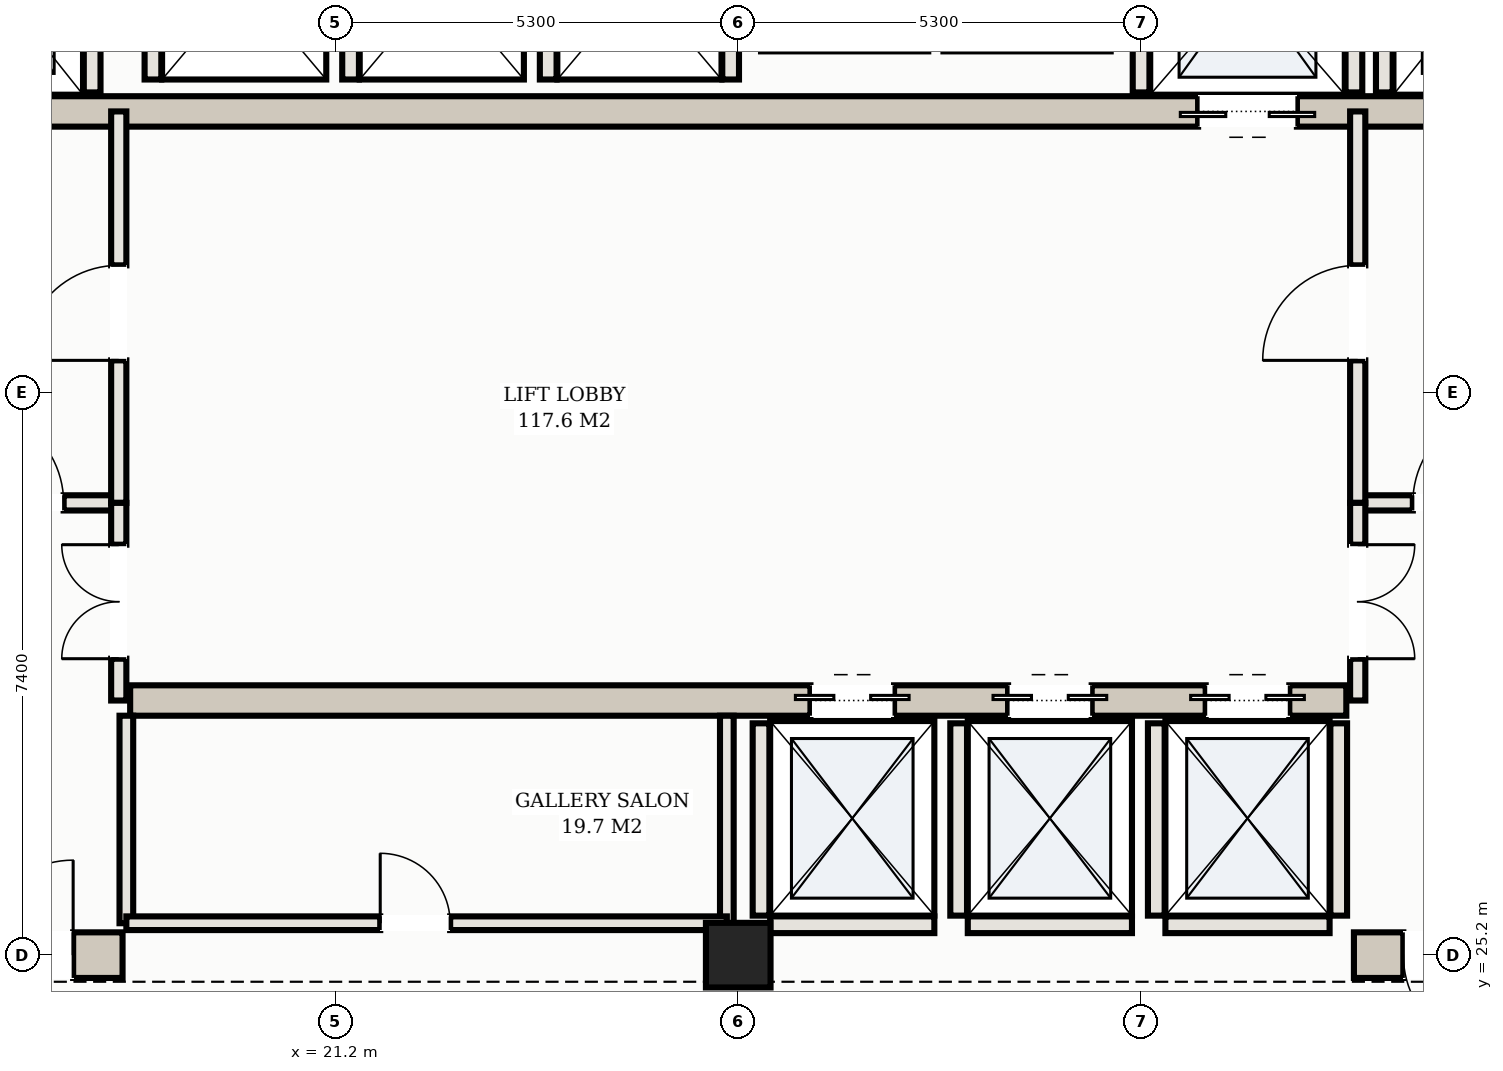
"""IFC4 building model, lengths in metres.
Left out: names, types, materials, properties, quantities, classifications, styles, units other than length and angle.
Written with IfcOpenShell. Run it as: python <this file> out.ifc"""

import sys

from ifc_helpers import new_model, si_unit, direction, frame, frame_2d, origin, origin_2d, place, context, subcontext, project, spatial, rectangle, hollow_rectangle, extrude, element, fill, save


model = new_model("IFC4")
c1 = context("Model", 3, precision=1e-05, world=origin(), true_north=direction((0.0, 1.0)))
c2 = subcontext(c1, "Body", "Model", "MODEL_VIEW")
j1 = project(units=[si_unit("LENGTHUNIT", "METRE"), si_unit("PLANEANGLEUNIT", "RADIAN")], contexts=[c1])
p1 = place(None, origin())
s1 = spatial("IfcSite", under=j1, at=p1, CompositionType="ELEMENT")
p2 = place(p1, origin())
s2 = spatial("IfcBuilding", under=s1, at=p2, CompositionType="ELEMENT")
p3 = place(p2, frame((0.0, 0.0, 175.5)))
s3 = spatial("IfcBuildingStorey", under=s2, at=p3, CompositionType="ELEMENT", Elevation=175.5)
p4 = place(p3, frame((10.3, 25.2, 0.0), z_axis=(0.0, 0.0, 1.0), x_axis=(1.0, 0.0, 0.0)))
e1 = element("IfcWall", 1, at=p4, inside=s3, PredefinedType="SHEAR", context=c2, shape_type="SweptSolid", body=[
    extrude(rectangle(XDim=8.1, YDim=0.6, at=frame_2d((4.05, 0.0))), origin(), (0.0, 0.0, 1.0), 3.1),
])
p5 = place(p4, frame((6.2, 0.0, 0.0)))
e2 = element("IfcOpeningElement", 2, at=p5, cuts=e1, PredefinedType="OPENING", context=c2, shape_type="SweptSolid", body=[
    extrude(rectangle(XDim=1.25, YDim=2.2, at=frame_2d((0.625, 1.1))), frame((0.0, 0.31, 0.0), z_axis=(0.0, -1.0, 0.0), x_axis=(1.0, 0.0, 0.0)), (0.0, 0.0, 1.0), 0.62),
])
p6 = place(p3, frame((34.6, 25.2, 0.0), z_axis=(0.0, 0.0, 1.0), x_axis=(1.0, 0.0, 0.0)))
e3 = element("IfcWall", 3, at=p6, inside=s3, PredefinedType="SHEAR", context=c2, shape_type="SweptSolid", body=[
    extrude(rectangle(XDim=8.1, YDim=0.6, at=frame_2d((4.05, 0.0))), origin(), (0.0, 0.0, 1.0), 3.1),
])
p7 = place(p6, frame((0.65, 0.0, 0.0)))
e4 = element("IfcOpeningElement", 4, at=p7, cuts=e3, PredefinedType="OPENING", context=c2, shape_type="SweptSolid", body=[
    extrude(rectangle(XDim=1.25, YDim=2.2, at=frame_2d((0.625, 1.1))), frame((0.0, 0.31, 0.0), z_axis=(0.0, -1.0, 0.0), x_axis=(1.0, 0.0, 0.0)), (0.0, 0.0, 1.0), 0.62),
])
p8 = place(p3, frame((15.5, 36.3, 0.0), z_axis=(0.0, 0.0, 1.0), x_axis=(1.0, 0.0, 0.0)))
e5 = element("IfcWall", 5, at=p8, inside=s3, PredefinedType="SHEAR", context=c2, shape_type="SweptSolid", body=[
    extrude(rectangle(XDim=22.0, YDim=0.4, at=frame_2d((11.0, 0.0))), origin(), (0.0, 0.0, 1.0), 3.1),
])
p9 = place(p8, frame((0.65, 0.0, 0.0)))
e6 = element("IfcOpeningElement", 6, at=p9, cuts=e5, PredefinedType="OPENING", context=c2, shape_type="SweptSolid", body=[
    extrude(rectangle(XDim=1.1, YDim=2.15, at=frame_2d((0.55, 1.075))), frame((0.0, 0.21, 0.0), z_axis=(0.0, -1.0, 0.0), x_axis=(1.0, 0.0, 0.0)), (0.0, 0.0, 1.0), 0.42),
])
p10 = place(p8, frame((20.25, 0.0, 0.0)))
e7 = element("IfcOpeningElement", 7, at=p10, cuts=e5, PredefinedType="OPENING", context=c2, shape_type="SweptSolid", body=[
    extrude(rectangle(XDim=1.1, YDim=2.15, at=frame_2d((0.55, 1.075))), frame((0.0, 0.21, 0.0), z_axis=(0.0, -1.0, 0.0), x_axis=(1.0, 0.0, 0.0)), (0.0, 0.0, 1.0), 0.42),
])
p11 = place(p8, frame((17.05, 0.0, 0.0)))
e8 = element("IfcOpeningElement", 8, at=p11, cuts=e5, PredefinedType="OPENING", context=c2, shape_type="SweptSolid", body=[
    extrude(rectangle(XDim=1.3, YDim=2.2, at=frame_2d((0.65, 1.1))), frame((0.0, 0.21, 0.0), z_axis=(0.0, -1.0, 0.0), x_axis=(1.0, 0.0, 0.0)), (0.0, 0.0, 1.0), 0.42),
])
p12 = place(p3, frame((18.5, 28.55, 0.0), z_axis=(0.0, 0.0, 1.0), x_axis=(1.0, 0.0, 0.0)))
e9 = element("IfcWall", 9, at=p12, inside=s3, PredefinedType="SHEAR", context=c2, shape_type="SweptSolid", body=[
    extrude(rectangle(XDim=16.0, YDim=0.4, at=frame_2d((8.0, 0.0))), origin(), (0.0, 0.0, 1.0), 3.1),
])
p13 = place(p12, frame((8.95, 0.0, 0.0)))
e10 = element("IfcOpeningElement", 10, at=p13, cuts=e9, PredefinedType="OPENING", context=c2, shape_type="SweptSolid", body=[
    extrude(rectangle(XDim=1.1, YDim=2.15, at=frame_2d((0.55, 1.075))), frame((0.0, 0.21, 0.0), z_axis=(0.0, -1.0, 0.0), x_axis=(1.0, 0.0, 0.0)), (0.0, 0.0, 1.0), 0.42),
])
p14 = place(p12, frame((11.55, 0.0, 0.0)))
e11 = element("IfcOpeningElement", 11, at=p14, cuts=e9, PredefinedType="OPENING", context=c2, shape_type="SweptSolid", body=[
    extrude(rectangle(XDim=1.1, YDim=2.15, at=frame_2d((0.55, 1.075))), frame((0.0, 0.21, 0.0), z_axis=(0.0, -1.0, 0.0), x_axis=(1.0, 0.0, 0.0)), (0.0, 0.0, 1.0), 0.42),
])
p15 = place(p12, frame((14.15, 0.0, 0.0)))
e12 = element("IfcOpeningElement", 12, at=p15, cuts=e9, PredefinedType="OPENING", context=c2, shape_type="SweptSolid", body=[
    extrude(rectangle(XDim=1.1, YDim=2.15, at=frame_2d((0.55, 1.075))), frame((0.0, 0.21, 0.0), z_axis=(0.0, -1.0, 0.0), x_axis=(1.0, 0.0, 0.0)), (0.0, 0.0, 1.0), 0.42),
])
p16 = place(p3, frame((26.5, 25.2, 0.0), z_axis=(0.0, 0.0, 1.0), x_axis=(1.0, 0.0, 0.0)))
e13 = element("IfcColumn", 13, at=p16, inside=s3, PredefinedType="COLUMN", context=c2, shape_type="SweptSolid", body=[
    extrude(hollow_rectangle(XDim=0.85, YDim=0.85, WallThickness=0.028, at=origin_2d()), origin(), (0.0, 0.0, 1.0), 3.3),
])
for number, where, z_axis, x_axis in (
    (14, (18.0, 36.55, 0.0), (0.0, 0.0, 1.0), (0.0, 1.0, 0.0)),
    (15, (35.0, 36.55, 0.0), (0.0, 0.0, 1.0), (0.0, 1.0, 0.0)),
    (16, (31.8, 36.55, 0.0), (0.0, 0.0, 1.0), (0.0, 1.0, 0.0)),
    (17, (34.6, 36.55, 0.0), (0.0, 0.0, 1.0), (0.0, 1.0, 0.0)),
):
    element("IfcWall", number, at=place(p3, frame(where, z_axis=z_axis, x_axis=x_axis)), inside=s3, PredefinedType="SOLIDWALL", context=c2, shape_type="SweptSolid", body=[
        extrude(rectangle(XDim=2.93, YDim=0.22, at=frame_2d((1.465, 0.0))), origin(), (0.0, 0.0, 1.0), 3.1),
    ])
p17 = place(p3, frame((26.8, 25.72, 0.0), z_axis=(0.0, 0.0, 1.0), x_axis=(0.0, 1.0, 0.0)))
e18 = element("IfcWall", 18, at=p17, inside=s3, PredefinedType="SOLIDWALL", context=c2, shape_type="SweptSolid", body=[
    extrude(rectangle(XDim=2.53, YDim=0.22, at=frame_2d((1.265, 0.0))), origin(), (0.0, 0.0, 1.0), 3.1),
])
p18 = place(p3, frame((26.92, 25.6, 0.0), z_axis=(0.0, 0.0, 1.0), x_axis=(1.0, 0.0, 0.0)))
e19 = element("IfcWall", 19, at=p18, inside=s3, PredefinedType="SOLIDWALL", context=c2, shape_type="SweptSolid", body=[
    extrude(rectangle(XDim=2.16, YDim=0.22, at=frame_2d((1.08, 0.0))), origin(), (0.0, 0.0, 1.0), 2.295),
])
p19 = place(p3, frame((29.4, 25.72, 0.0), z_axis=(0.0, 0.0, 1.0), x_axis=(0.0, 1.0, 0.0)))
e20 = element("IfcWall", 20, at=p19, inside=s3, PredefinedType="SOLIDWALL", context=c2, shape_type="SweptSolid", body=[
    extrude(rectangle(XDim=2.53, YDim=0.22, at=frame_2d((1.265, 0.0))), origin(), (0.0, 0.0, 1.0), 3.1),
])
p20 = place(p3, frame((29.52, 25.6, 0.0), z_axis=(0.0, 0.0, 1.0), x_axis=(1.0, 0.0, 0.0)))
e21 = element("IfcWall", 21, at=p20, inside=s3, PredefinedType="SOLIDWALL", context=c2, shape_type="SweptSolid", body=[
    extrude(rectangle(XDim=2.16, YDim=0.22, at=frame_2d((1.08, 0.0))), origin(), (0.0, 0.0, 1.0), 2.295),
])
for number, where, z_axis, x_axis in (
    (22, (32.0, 25.72, 0.0), (0.0, 0.0, 1.0), (0.0, 1.0, 0.0)),
    (23, (34.4, 25.72, 0.0), (0.0, 0.0, 1.0), (0.0, 1.0, 0.0)),
):
    element("IfcWall", number, at=place(p3, frame(where, z_axis=z_axis, x_axis=x_axis)), inside=s3, PredefinedType="SOLIDWALL", context=c2, shape_type="SweptSolid", body=[
        extrude(rectangle(XDim=2.53, YDim=0.22, at=frame_2d((1.265, 0.0))), origin(), (0.0, 0.0, 1.0), 3.1),
    ])
p21 = place(p3, frame((32.12, 25.6, 0.0), z_axis=(0.0, 0.0, 1.0), x_axis=(1.0, 0.0, 0.0)))
e24 = element("IfcWall", 24, at=p21, inside=s3, PredefinedType="SOLIDWALL", context=c2, shape_type="SweptSolid", body=[
    extrude(rectangle(XDim=2.16, YDim=0.22, at=frame_2d((1.08, 0.0))), origin(), (0.0, 0.0, 1.0), 2.295),
])
for number, where, z_axis, x_axis in (
    (25, (18.8, 36.72, 0.0), (0.0, 0.0, 1.0), (0.0, 1.0, 0.0)),
    (26, (21.4, 36.72, 0.0), (0.0, 0.0, 1.0), (0.0, 1.0, 0.0)),
    (27, (24.0, 36.72, 0.0), (0.0, 0.0, 1.0), (0.0, 1.0, 0.0)),
    (28, (26.4, 36.72, 0.0), (0.0, 0.0, 1.0), (0.0, 1.0, 0.0)),
):
    element("IfcWall", number, at=place(p3, frame(where, z_axis=z_axis, x_axis=x_axis)), inside=s3, PredefinedType="SOLIDWALL", context=c2, shape_type="SweptSolid", body=[
        extrude(rectangle(XDim=2.56, YDim=0.22, at=frame_2d((1.28, 0.0))), origin(), (0.0, 0.0, 1.0), 3.1),
    ])
p22 = place(p3, frame((15.1, 31.15, 0.0), z_axis=(0.0, 0.0, 1.0), x_axis=(1.0, 0.0, 0.0)))
e29 = element("IfcWall", 29, at=p22, inside=s3, PredefinedType="PARTITIONING", context=c2, shape_type="SweptSolid", body=[
    extrude(rectangle(XDim=3.25, YDim=0.2, at=frame_2d((1.625, 0.0))), origin(), (0.0, 0.0, 1.0), 2.38),
])
p23 = place(p22, frame((1.275, 0.0, 0.0)))
e30 = element("IfcOpeningElement", 30, at=p23, cuts=e29, PredefinedType="OPENING", context=c2, shape_type="SweptSolid", body=[
    extrude(rectangle(XDim=1.25, YDim=2.2, at=frame_2d((0.625, 1.1))), frame((0.0, 0.11, 0.0), z_axis=(0.0, -1.0, 0.0), x_axis=(1.0, 0.0, 0.0)), (0.0, 0.0, 1.0), 0.22),
])
p24 = place(p3, frame((18.35, 31.15, 0.0), z_axis=(0.0, 0.0, 1.0), x_axis=(0.0, 1.0, 0.0)))
e31 = element("IfcWall", 31, at=p24, inside=s3, PredefinedType="PARTITIONING", context=c2, shape_type="SweptSolid", body=[
    extrude(rectangle(XDim=5.15, YDim=0.2, at=frame_2d((2.575, 0.0))), origin(), (0.0, 0.0, 1.0), 2.38),
])
p25 = place(p24, frame((1.875, 0.0, 0.0)))
e32 = element("IfcOpeningElement", 32, at=p25, cuts=e31, PredefinedType="OPENING", context=c2, shape_type="SweptSolid", body=[
    extrude(rectangle(XDim=1.25, YDim=2.2, at=frame_2d((0.625, 1.1))), frame((0.0, 0.11, 0.0), z_axis=(0.0, -1.0, 0.0), x_axis=(1.0, 0.0, 0.0)), (0.0, 0.0, 1.0), 0.22),
])
p26 = place(p3, frame((34.65, 31.15, 0.0), z_axis=(0.0, 0.0, 1.0), x_axis=(1.0, 0.0, 0.0)))
e33 = element("IfcWall", 33, at=p26, inside=s3, PredefinedType="PARTITIONING", context=c2, shape_type="SweptSolid", body=[
    extrude(rectangle(XDim=3.25, YDim=0.2, at=frame_2d((1.625, 0.0))), origin(), (0.0, 0.0, 1.0), 2.38),
])
p27 = place(p26, frame((0.725, 0.0, 0.0)))
e34 = element("IfcOpeningElement", 34, at=p27, cuts=e33, PredefinedType="OPENING", context=c2, shape_type="SweptSolid", body=[
    extrude(rectangle(XDim=1.25, YDim=2.2, at=frame_2d((0.625, 1.1))), frame((0.0, 0.11, 0.0), z_axis=(0.0, -1.0, 0.0), x_axis=(1.0, 0.0, 0.0)), (0.0, 0.0, 1.0), 0.22),
])
p28 = place(p3, frame((34.65, 31.15, 0.0), z_axis=(0.0, 0.0, 1.0), x_axis=(0.0, 1.0, 0.0)))
e35 = element("IfcWall", 35, at=p28, inside=s3, PredefinedType="PARTITIONING", context=c2, shape_type="SweptSolid", body=[
    extrude(rectangle(XDim=5.15, YDim=0.2, at=frame_2d((2.575, 0.0))), origin(), (0.0, 0.0, 1.0), 2.38),
])
p29 = place(p28, frame((1.875, 0.0, 0.0)))
e36 = element("IfcOpeningElement", 36, at=p29, cuts=e35, PredefinedType="OPENING", context=c2, shape_type="SweptSolid", body=[
    extrude(rectangle(XDim=1.25, YDim=2.2, at=frame_2d((0.625, 1.1))), frame((0.0, 0.11, 0.0), z_axis=(0.0, -1.0, 0.0), x_axis=(1.0, 0.0, 0.0)), (0.0, 0.0, 1.0), 0.22),
])
p30 = place(p3, frame((18.35, 28.55, 0.0), z_axis=(0.0, 0.0, 1.0), x_axis=(0.0, 1.0, 0.0)))
e37 = element("IfcWall", 37, at=p30, inside=s3, PredefinedType="PARTITIONING", context=c2, shape_type="SweptSolid", body=[
    extrude(rectangle(XDim=2.6, YDim=0.2, at=frame_2d((1.3, 0.0))), origin(), (0.0, 0.0, 1.0), 2.38),
])
p31 = place(p30, frame((0.55, 0.0, 0.0)))
e38 = element("IfcOpeningElement", 38, at=p31, cuts=e37, PredefinedType="OPENING", context=c2, shape_type="SweptSolid", body=[
    extrude(rectangle(XDim=1.5, YDim=2.25, at=frame_2d((0.75, 1.125))), frame((0.0, 0.11, 0.0), z_axis=(0.0, -1.0, 0.0), x_axis=(1.0, 0.0, 0.0)), (0.0, 0.0, 1.0), 0.22),
])
p32 = place(p3, frame((34.65, 28.55, 0.0), z_axis=(0.0, 0.0, 1.0), x_axis=(0.0, 1.0, 0.0)))
e39 = element("IfcWall", 39, at=p32, inside=s3, PredefinedType="PARTITIONING", context=c2, shape_type="SweptSolid", body=[
    extrude(rectangle(XDim=2.6, YDim=0.2, at=frame_2d((1.3, 0.0))), origin(), (0.0, 0.0, 1.0), 2.38),
])
p33 = place(p32, frame((0.55, 0.0, 0.0)))
e40 = element("IfcOpeningElement", 40, at=p33, cuts=e39, PredefinedType="OPENING", context=c2, shape_type="SweptSolid", body=[
    extrude(rectangle(XDim=1.5, YDim=2.25, at=frame_2d((0.75, 1.125))), frame((0.0, 0.11, 0.0), z_axis=(0.0, -1.0, 0.0), x_axis=(1.0, 0.0, 0.0)), (0.0, 0.0, 1.0), 0.22),
])
for number, where, z_axis, x_axis in (
    (41, (18.45, 25.62, 0.0), (0.0, 0.0, 1.0), (0.0, 1.0, 0.0)),
    (42, (26.35, 25.62, 0.0), (0.0, 0.0, 1.0), (0.0, 1.0, 0.0)),
):
    element("IfcWall", number, at=place(p3, frame(where, z_axis=z_axis, x_axis=x_axis)), inside=s3, PredefinedType="PARTITIONING", context=c2, shape_type="SweptSolid", body=[
        extrude(rectangle(XDim=2.73, YDim=0.18, at=frame_2d((1.365, 0.0))), origin(), (0.0, 0.0, 1.0), 2.38),
    ])
p34 = place(p3, frame((18.45, 25.62, 0.0), z_axis=(0.0, 0.0, 1.0), x_axis=(1.0, 0.0, 0.0)))
e43 = element("IfcWall", 43, at=p34, inside=s3, PredefinedType="PARTITIONING", context=c2, shape_type="SweptSolid", body=[
    extrude(rectangle(XDim=7.9, YDim=0.18, at=frame_2d((3.95, 0.0))), origin(), (0.0, 0.0, 1.0), 2.38),
])
p35 = place(p34, frame((3.34, 0.0, 0.0)))
e44 = element("IfcOpeningElement", 44, at=p35, cuts=e43, PredefinedType="OPENING", context=c2, shape_type="SweptSolid", body=[
    extrude(rectangle(XDim=0.92, YDim=2.15, at=frame_2d((0.46, 1.075))), frame((0.0, 0.1, 0.0), z_axis=(0.0, -1.0, 0.0), x_axis=(1.0, 0.0, 0.0)), (0.0, 0.0, 1.0), 0.2),
])
p36 = place(p11, frame((1.3, 0.0, 0.0), z_axis=(0.0, 0.0, 1.0), x_axis=(-1.0, 0.0, 0.0)))
e45 = element("IfcDoor", 45, at=p36, inside=s3, OperationType="DOUBLE_DOOR_SLIDING", PredefinedType="DOOR", context=c2, shape_type="SweptSolid", body=[
    extrude(rectangle(XDim=1.3, YDim=2.2, at=frame_2d((0.65, 1.1))), frame((0.0, 0.025, 0.0), z_axis=(0.0, -1.0, 0.0), x_axis=(1.0, 0.0, 0.0)), (0.0, 0.0, 1.0), 0.05),
])
fill(e8, e45)
p37 = place(p13, origin())
e46 = element("IfcDoor", 46, at=p37, inside=s3, OperationType="DOUBLE_DOOR_SLIDING", PredefinedType="DOOR", context=c2, shape_type="SweptSolid", body=[
    extrude(rectangle(XDim=1.1, YDim=2.15, at=frame_2d((0.55, 1.075))), frame((0.0, 0.025, 0.0), z_axis=(0.0, -1.0, 0.0), x_axis=(1.0, 0.0, 0.0)), (0.0, 0.0, 1.0), 0.05),
])
fill(e10, e46)
p38 = place(p14, origin())
e47 = element("IfcDoor", 47, at=p38, inside=s3, OperationType="DOUBLE_DOOR_SLIDING", PredefinedType="DOOR", context=c2, shape_type="SweptSolid", body=[
    extrude(rectangle(XDim=1.1, YDim=2.15, at=frame_2d((0.55, 1.075))), frame((0.0, 0.025, 0.0), z_axis=(0.0, -1.0, 0.0), x_axis=(1.0, 0.0, 0.0)), (0.0, 0.0, 1.0), 0.05),
])
fill(e11, e47)
p39 = place(p15, origin())
e48 = element("IfcDoor", 48, at=p39, inside=s3, OperationType="DOUBLE_DOOR_SLIDING", PredefinedType="DOOR", context=c2, shape_type="SweptSolid", body=[
    extrude(rectangle(XDim=1.1, YDim=2.15, at=frame_2d((0.55, 1.075))), frame((0.0, 0.025, 0.0), z_axis=(0.0, -1.0, 0.0), x_axis=(1.0, 0.0, 0.0)), (0.0, 0.0, 1.0), 0.05),
])
fill(e12, e48)
p40 = place(p5, origin())
e49 = element("IfcDoor", 49, at=p40, inside=s3, OperationType="SINGLE_SWING_RIGHT", PredefinedType="DOOR", context=c2, shape_type="SweptSolid", body=[
    extrude(rectangle(XDim=1.25, YDim=2.2, at=frame_2d((0.625, 1.1))), frame((0.0, 0.025, 0.0), z_axis=(0.0, -1.0, 0.0), x_axis=(1.0, 0.0, 0.0)), (0.0, 0.0, 1.0), 0.05),
])
fill(e2, e49)
p41 = place(p7, frame((1.25, 0.0, 0.0), z_axis=(0.0, 0.0, 1.0), x_axis=(-1.0, 0.0, 0.0)))
e50 = element("IfcDoor", 50, at=p41, inside=s3, OperationType="SINGLE_SWING_LEFT", PredefinedType="DOOR", context=c2, shape_type="SweptSolid", body=[
    extrude(rectangle(XDim=1.25, YDim=2.2, at=frame_2d((0.625, 1.1))), frame((0.0, 0.025, 0.0), z_axis=(0.0, -1.0, 0.0), x_axis=(1.0, 0.0, 0.0)), (0.0, 0.0, 1.0), 0.05),
])
fill(e4, e50)
p42 = place(p23, origin())
e51 = element("IfcDoor", 51, at=p42, inside=s3, OperationType="SINGLE_SWING_LEFT", PredefinedType="DOOR", context=c2, shape_type="SweptSolid", body=[
    extrude(rectangle(XDim=1.25, YDim=2.2, at=frame_2d((0.625, 1.1))), frame((0.0, 0.025, 0.0), z_axis=(0.0, -1.0, 0.0), x_axis=(1.0, 0.0, 0.0)), (0.0, 0.0, 1.0), 0.05),
])
fill(e30, e51)
p43 = place(p25, origin())
e52 = element("IfcDoor", 52, at=p43, inside=s3, OperationType="SINGLE_SWING_LEFT", PredefinedType="DOOR", context=c2, shape_type="SweptSolid", body=[
    extrude(rectangle(XDim=1.25, YDim=2.2, at=frame_2d((0.625, 1.1))), frame((0.0, 0.025, 0.0), z_axis=(0.0, -1.0, 0.0), x_axis=(1.0, 0.0, 0.0)), (0.0, 0.0, 1.0), 0.05),
])
fill(e32, e52)
p44 = place(p27, origin())
e53 = element("IfcDoor", 53, at=p44, inside=s3, OperationType="SINGLE_SWING_RIGHT", PredefinedType="DOOR", context=c2, shape_type="SweptSolid", body=[
    extrude(rectangle(XDim=1.25, YDim=2.2, at=frame_2d((0.625, 1.1))), frame((0.0, 0.025, 0.0), z_axis=(0.0, -1.0, 0.0), x_axis=(1.0, 0.0, 0.0)), (0.0, 0.0, 1.0), 0.05),
])
fill(e34, e53)
p45 = place(p29, origin())
e54 = element("IfcDoor", 54, at=p45, inside=s3, OperationType="SINGLE_SWING_LEFT", PredefinedType="DOOR", context=c2, shape_type="SweptSolid", body=[
    extrude(rectangle(XDim=1.25, YDim=2.2, at=frame_2d((0.625, 1.1))), frame((0.0, 0.025, 0.0), z_axis=(0.0, -1.0, 0.0), x_axis=(1.0, 0.0, 0.0)), (0.0, 0.0, 1.0), 0.05),
])
fill(e36, e54)
p46 = place(p31, origin())
e55 = element("IfcDoor", 55, at=p46, inside=s3, OperationType="DOUBLE_DOOR_SINGLE_SWING", PredefinedType="DOOR", context=c2, shape_type="SweptSolid", body=[
    extrude(rectangle(XDim=1.5, YDim=2.25, at=frame_2d((0.75, 1.125))), frame((0.0, 0.025, 0.0), z_axis=(0.0, -1.0, 0.0), x_axis=(1.0, 0.0, 0.0)), (0.0, 0.0, 1.0), 0.05),
])
fill(e38, e55)
p47 = place(p33, frame((1.5, 0.0, 0.0), z_axis=(0.0, 0.0, 1.0), x_axis=(-1.0, 0.0, 0.0)))
e56 = element("IfcDoor", 56, at=p47, inside=s3, OperationType="DOUBLE_DOOR_SINGLE_SWING", PredefinedType="DOOR", context=c2, shape_type="SweptSolid", body=[
    extrude(rectangle(XDim=1.5, YDim=2.25, at=frame_2d((0.75, 1.125))), frame((0.0, 0.025, 0.0), z_axis=(0.0, -1.0, 0.0), x_axis=(1.0, 0.0, 0.0)), (0.0, 0.0, 1.0), 0.05),
])
fill(e40, e56)
p48 = place(p35, origin())
e57 = element("IfcDoor", 57, at=p48, inside=s3, OperationType="SINGLE_SWING_LEFT", PredefinedType="DOOR", context=c2, shape_type="SweptSolid", body=[
    extrude(rectangle(XDim=0.92, YDim=2.15, at=frame_2d((0.46, 1.075))), frame((0.0, 0.025, 0.0), z_axis=(0.0, -1.0, 0.0), x_axis=(1.0, 0.0, 0.0)), (0.0, 0.0, 1.0), 0.05),
])
fill(e44, e57)
save(model, sys.argv[1])
